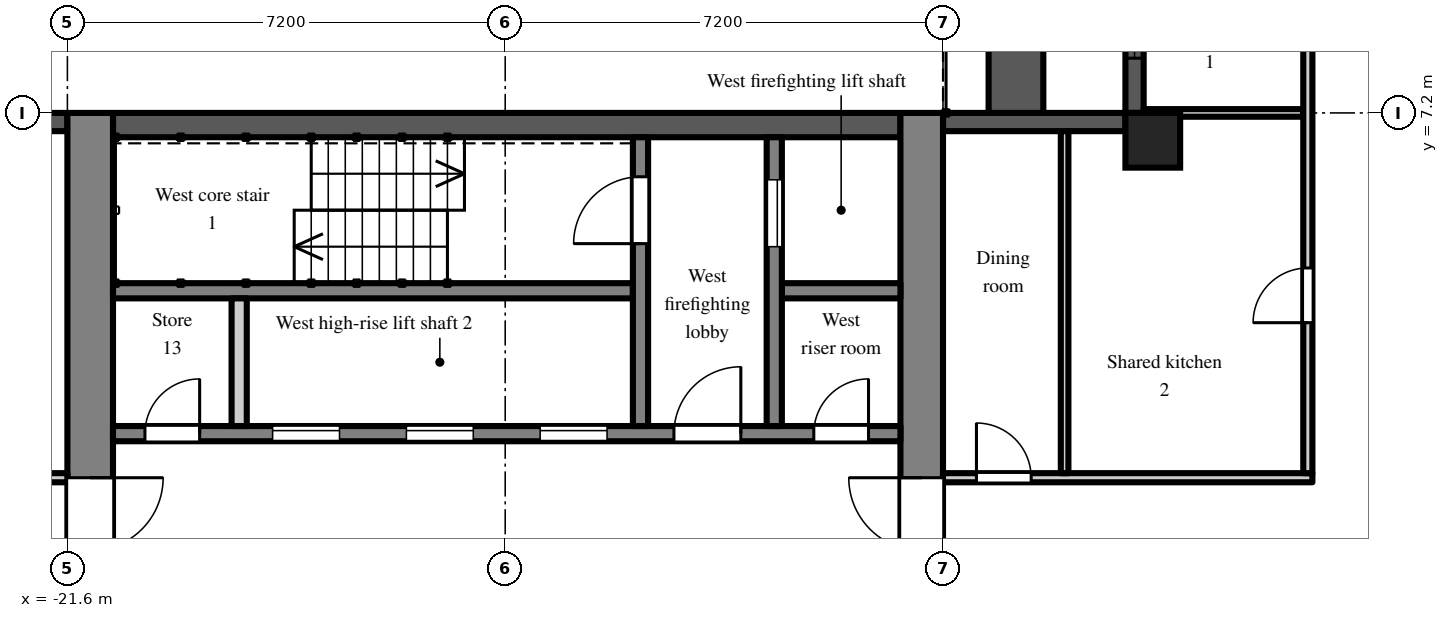
"""IFC4 building model, lengths in metres.
Left out: names, types, materials, properties, quantities, classifications, styles, units other than length and angle.
Written with IfcOpenShell. Run it as: python <this file> out.ifc"""

import sys

from ifc_helpers import new_model, si_unit, direction, frame, frame_2d, origin, origin_2d, place, context, subcontext, project, spatial, rectangle, extrude, element, fill, save


model = new_model("IFC4")
c1 = context("Model", 3, precision=1e-05, world=origin(), true_north=direction((0.0, 1.0)))
c2 = subcontext(c1, "Body", "Model", "MODEL_VIEW")
j1 = project(units=[si_unit("LENGTHUNIT", "METRE"), si_unit("PLANEANGLEUNIT", "RADIAN")], contexts=[c1])
p1 = place(None, origin())
s1 = spatial("IfcSite", under=j1, at=p1, CompositionType="ELEMENT")
p2 = place(p1, origin())
s2 = spatial("IfcBuilding", under=s1, at=p2, CompositionType="ELEMENT")
p3 = place(p2, frame((0.0, 0.0, 191.7)))
s3 = spatial("IfcBuildingStorey", under=s2, at=p3, CompositionType="ELEMENT", Elevation=191.7)
p4 = place(p3, frame((-3.75, 6.75, 0.0), z_axis=(0.0, 0.0, 1.0), x_axis=(1.0, 0.0, 0.0)))
e1 = element("IfcColumn", 1, at=p4, inside=s3, PredefinedType="COLUMN", context=c2, shape_type="SweptSolid", body=[
    extrude(rectangle(XDim=0.9, YDim=0.9, at=origin_2d()), origin(), (0.0, 0.0, 1.0), 3.0),
])
p5 = place(p3, frame((-4.05, 14.4, 0.0), z_axis=(0.0, 0.0, 1.0), x_axis=(0.0, -1.0, 0.0)))
e2 = element("IfcWall", 2, at=p5, inside=s3, PredefinedType="SOLIDWALL", context=c2, shape_type="SweptSolid", body=[
    extrude(rectangle(XDim=7.2, YDim=0.3, at=frame_2d((3.6, 0.0))), origin(), (0.0, 0.0, 1.0), 2.55),
])
p6 = place(p5, frame((3.0, 0.0, 0.0)))
e3 = element("IfcOpeningElement", 3, at=p6, cuts=e2, PredefinedType="OPENING", context=c2, shape_type="SweptSolid", body=[
    extrude(rectangle(XDim=1.2, YDim=2.05, at=frame_2d((0.6, 1.025))), frame((0.0, 0.16, 0.0), z_axis=(0.0, -1.0, 0.0), x_axis=(1.0, 0.0, 0.0)), (0.0, 0.0, 1.0), 0.32),
])
p7 = place(p5, frame((0.9, 0.0, 0.2)))
e4 = element("IfcOpeningElement", 4, at=p7, cuts=e2, PredefinedType="OPENING", context=c2, shape_type="SweptSolid", body=[
    extrude(rectangle(XDim=1.8, YDim=1.85, at=frame_2d((0.9, 0.925))), frame((0.0, 0.16, 0.0), z_axis=(0.0, -1.0, 0.0), x_axis=(1.0, 0.0, 0.0)), (0.0, 0.0, 1.0), 0.32),
])
p8 = place(p5, frame((4.5, 0.0, 0.2)))
e5 = element("IfcOpeningElement", 5, at=p8, cuts=e2, PredefinedType="OPENING", context=c2, shape_type="SweptSolid", body=[
    extrude(rectangle(XDim=1.8, YDim=1.85, at=frame_2d((0.9, 0.925))), frame((0.0, 0.16, 0.0), z_axis=(0.0, -1.0, 0.0), x_axis=(1.0, 0.0, 0.0)), (0.0, 0.0, 1.0), 0.32),
])
p9 = place(p3, frame((-4.2, 7.05, 0.0), z_axis=(0.0, 0.0, 1.0), x_axis=(-1.0, 0.0, 0.0)))
e6 = element("IfcWall", 6, at=p9, inside=s3, PredefinedType="SOLIDWALL", context=c2, shape_type="SweptSolid", body=[
    extrude(rectangle(XDim=3.0, YDim=0.3, at=frame_2d((1.5, 0.0))), origin(), (0.0, 0.0, 1.0), 2.55),
])
p10 = place(p3, frame((-21.6, 7.05, 0.0), z_axis=(0.0, 0.0, 1.0), x_axis=(-1.0, 0.0, 0.0)))
e7 = element("IfcWall", 7, at=p10, inside=s3, PredefinedType="SOLIDWALL", context=c2, shape_type="SweptSolid", body=[
    extrude(rectangle(XDim=2.7, YDim=0.3, at=frame_2d((1.35, 0.0))), origin(), (0.0, 0.0, 1.0), 2.3),
])
p11 = place(p10, frame((0.75, 0.0, 0.2)))
e8 = element("IfcOpeningElement", 8, at=p11, cuts=e7, PredefinedType="OPENING", context=c2, shape_type="SweptSolid", body=[
    extrude(rectangle(XDim=1.2, YDim=1.85, at=frame_2d((0.6, 0.925))), frame((0.0, 0.16, 0.0), z_axis=(0.0, -1.0, 0.0), x_axis=(1.0, 0.0, 0.0)), (0.0, 0.0, 1.0), 0.32),
])
p12 = place(p3, frame((-6.0, 7.2, 0.0), z_axis=(0.0, 0.0, 1.0), x_axis=(0.0, 1.0, 0.0)))
e9 = element("IfcWall", 9, at=p12, inside=s3, PredefinedType="PARAPET", context=c2, shape_type="SweptSolid", body=[
    extrude(rectangle(XDim=7.2, YDim=0.9, at=frame_2d((3.6, 0.0))), origin(), (0.0, 0.0, 1.0), 0.8),
])
p13 = place(p3, frame((-7.55, -7.2, 0.0), z_axis=(0.0, 0.0, 1.0), x_axis=(0.0, 1.0, 0.0)))
e10 = element("IfcWall", 10, at=p13, inside=s3, PredefinedType="SHEAR", context=c2, shape_type="SweptSolid", body=[
    extrude(rectangle(XDim=14.4, YDim=0.7, at=frame_2d((7.2, 0.0))), origin(), (0.0, 0.0, 1.0), 2.55),
])
p14 = place(p13, frame((6.0, 0.0, 0.0)))
e11 = element("IfcOpeningElement", 11, at=p14, cuts=e10, PredefinedType="OPENING", context=c2, shape_type="SweptSolid", body=[
    extrude(rectangle(XDim=2.4, YDim=2.2, at=frame_2d((1.2, 1.1))), frame((0.0, 0.36, 0.0), z_axis=(0.0, -1.0, 0.0), x_axis=(1.0, 0.0, 0.0)), (0.0, 0.0, 1.0), 0.72),
])
p15 = place(p3, frame((-21.225, -7.2, 0.0), z_axis=(0.0, 0.0, 1.0), x_axis=(0.0, 1.0, 0.0)))
e12 = element("IfcWall", 12, at=p15, inside=s3, PredefinedType="SHEAR", context=c2, shape_type="SweptSolid", body=[
    extrude(rectangle(XDim=14.4, YDim=0.75, at=frame_2d((7.2, 0.0))), origin(), (0.0, 0.0, 1.0), 2.55),
])
p16 = place(p15, frame((6.0, 0.0, 0.0)))
e13 = element("IfcOpeningElement", 13, at=p16, cuts=e12, PredefinedType="OPENING", context=c2, shape_type="SweptSolid", body=[
    extrude(rectangle(XDim=2.4, YDim=2.2, at=frame_2d((1.2, 1.1))), frame((0.0, 0.385, 0.0), z_axis=(0.0, -1.0, 0.0), x_axis=(1.0, 0.0, 0.0)), (0.0, 0.0, 1.0), 0.77),
])
p17 = place(p3, frame((-7.9, 7.0, 0.0), z_axis=(0.0, 0.0, 1.0), x_axis=(-1.0, 0.0, 0.0)))
e14 = element("IfcWall", 14, at=p17, inside=s3, PredefinedType="SHEAR", context=c2, shape_type="SweptSolid", body=[
    extrude(rectangle(XDim=12.95, YDim=0.4, at=frame_2d((6.475, 0.0))), origin(), (0.0, 0.0, 1.0), 2.55),
])
p18 = place(p3, frame((-7.9, 1.925, 0.0), z_axis=(0.0, 0.0, 1.0), x_axis=(-1.0, 0.0, 0.0)))
e15 = element("IfcWall", 15, at=p18, inside=s3, PredefinedType="SHEAR", context=c2, shape_type="SweptSolid", body=[
    extrude(rectangle(XDim=12.95, YDim=0.25, at=frame_2d((6.475, 0.0))), origin(), (0.0, 0.0, 1.0), 2.55),
])
p19 = place(p18, frame((4.825, 0.0, 0.0)))
e16 = element("IfcOpeningElement", 16, at=p19, cuts=e15, PredefinedType="OPENING", context=c2, shape_type="SweptSolid", body=[
    extrude(rectangle(XDim=1.1, YDim=2.1, at=frame_2d((0.55, 1.05))), frame((0.0, 0.135, 0.0), z_axis=(0.0, -1.0, 0.0), x_axis=(1.0, 0.0, 0.0)), (0.0, 0.0, 1.0), 0.27),
])
p20 = place(p18, frame((7.025, 0.0, 0.0)))
e17 = element("IfcOpeningElement", 17, at=p20, cuts=e15, PredefinedType="OPENING", context=c2, shape_type="SweptSolid", body=[
    extrude(rectangle(XDim=1.1, YDim=2.1, at=frame_2d((0.55, 1.05))), frame((0.0, 0.135, 0.0), z_axis=(0.0, -1.0, 0.0), x_axis=(1.0, 0.0, 0.0)), (0.0, 0.0, 1.0), 0.27),
])
p21 = place(p18, frame((9.225, 0.0, 0.0)))
e18 = element("IfcOpeningElement", 18, at=p21, cuts=e15, PredefinedType="OPENING", context=c2, shape_type="SweptSolid", body=[
    extrude(rectangle(XDim=1.1, YDim=2.1, at=frame_2d((0.55, 1.05))), frame((0.0, 0.135, 0.0), z_axis=(0.0, -1.0, 0.0), x_axis=(1.0, 0.0, 0.0)), (0.0, 0.0, 1.0), 0.27),
])
p22 = place(p18, frame((0.525, 0.0, 0.0)))
e19 = element("IfcOpeningElement", 19, at=p22, cuts=e15, PredefinedType="OPENING", context=c2, shape_type="SweptSolid", body=[
    extrude(rectangle(XDim=0.9, YDim=2.1, at=frame_2d((0.45, 1.05))), frame((0.0, 0.135, 0.0), z_axis=(0.0, -1.0, 0.0), x_axis=(1.0, 0.0, 0.0)), (0.0, 0.0, 1.0), 0.27),
])
p23 = place(p18, frame((2.625, 0.0, 0.0)))
e20 = element("IfcOpeningElement", 20, at=p23, cuts=e15, PredefinedType="OPENING", context=c2, shape_type="SweptSolid", body=[
    extrude(rectangle(XDim=1.1, YDim=2.1, at=frame_2d((0.55, 1.05))), frame((0.0, 0.135, 0.0), z_axis=(0.0, -1.0, 0.0), x_axis=(1.0, 0.0, 0.0)), (0.0, 0.0, 1.0), 0.27),
])
p24 = place(p18, frame((11.525, 0.0, 0.0)))
e21 = element("IfcOpeningElement", 21, at=p24, cuts=e15, PredefinedType="OPENING", context=c2, shape_type="SweptSolid", body=[
    extrude(rectangle(XDim=0.9, YDim=2.1, at=frame_2d((0.45, 1.05))), frame((0.0, 0.135, 0.0), z_axis=(0.0, -1.0, 0.0), x_axis=(1.0, 0.0, 0.0)), (0.0, 0.0, 1.0), 0.27),
])
p25 = place(p3, frame((-7.9, 4.275, 0.0), z_axis=(0.0, 0.0, 1.0), x_axis=(-1.0, 0.0, 0.0)))
e22 = element("IfcWall", 22, at=p25, inside=s3, PredefinedType="SHEAR", context=c2, shape_type="SweptSolid", body=[
    extrude(rectangle(XDim=1.95, YDim=0.25, at=frame_2d((0.975, 0.0))), origin(), (0.0, 0.0, 1.0), 2.55),
])
p26 = place(p3, frame((-12.3, 4.275, 0.0), z_axis=(0.0, 0.0, 1.0), x_axis=(-1.0, 0.0, 0.0)))
e23 = element("IfcWall", 23, at=p26, inside=s3, PredefinedType="SHEAR", context=c2, shape_type="SweptSolid", body=[
    extrude(rectangle(XDim=8.55, YDim=0.25, at=frame_2d((4.275, 0.0))), origin(), (0.0, 0.0, 1.0), 2.55),
])
p27 = place(p3, frame((-9.975, 2.05, 0.0), z_axis=(0.0, 0.0, 1.0), x_axis=(0.0, 1.0, 0.0)))
e24 = element("IfcWall", 24, at=p27, inside=s3, PredefinedType="SHEAR", context=c2, shape_type="SweptSolid", body=[
    extrude(rectangle(XDim=4.75, YDim=0.25, at=frame_2d((2.375, 0.0))), origin(), (0.0, 0.0, 1.0), 2.55),
])
p28 = place(p27, frame((2.95, 0.0, 0.0)))
e25 = element("IfcOpeningElement", 25, at=p28, cuts=e24, PredefinedType="OPENING", context=c2, shape_type="SweptSolid", body=[
    extrude(rectangle(XDim=1.1, YDim=2.1, at=frame_2d((0.55, 1.05))), frame((0.0, 0.135, 0.0), z_axis=(0.0, -1.0, 0.0), x_axis=(1.0, 0.0, 0.0)), (0.0, 0.0, 1.0), 0.27),
])
p29 = place(p3, frame((-12.175, 2.05, 0.0), z_axis=(0.0, 0.0, 1.0), x_axis=(0.0, 1.0, 0.0)))
e26 = element("IfcWall", 26, at=p29, inside=s3, PredefinedType="SHEAR", context=c2, shape_type="SweptSolid", body=[
    extrude(rectangle(XDim=4.75, YDim=0.25, at=frame_2d((2.375, 0.0))), origin(), (0.0, 0.0, 1.0), 2.55),
])
p30 = place(p29, frame((3.0, 0.0, 0.0)))
e27 = element("IfcOpeningElement", 27, at=p30, cuts=e26, PredefinedType="OPENING", context=c2, shape_type="SweptSolid", body=[
    extrude(rectangle(XDim=1.1, YDim=2.1, at=frame_2d((0.55, 1.05))), frame((0.0, 0.135, 0.0), z_axis=(0.0, -1.0, 0.0), x_axis=(1.0, 0.0, 0.0)), (0.0, 0.0, 1.0), 0.27),
])
p31 = place(p3, frame((-18.775, 2.05, 0.0), z_axis=(0.0, 0.0, 1.0), x_axis=(0.0, 1.0, 0.0)))
e28 = element("IfcWall", 28, at=p31, inside=s3, PredefinedType="PARTITIONING", context=c2, shape_type="SweptSolid", body=[
    extrude(rectangle(XDim=2.1, YDim=0.25, at=frame_2d((1.05, 0.0))), origin(), (0.0, 0.0, 1.0), 2.55),
])
p32 = place(p3, frame((-36.5, 1.2, 0.0), z_axis=(0.0, 0.0, 1.0), x_axis=(1.0, 0.0, 0.0)))
e29 = element("IfcWall", 29, at=p32, inside=s3, PredefinedType="PARTITIONING", context=c2, shape_type="SweptSolid", body=[
    extrude(rectangle(XDim=14.9, YDim=0.15, at=frame_2d((7.45, 0.0))), origin(), (0.0, 0.0, 1.0), 2.55),
])
p33 = place(p32, frame((10.1, 0.0, 0.0)))
e30 = element("IfcOpeningElement", 30, at=p33, cuts=e29, PredefinedType="OPENING", context=c2, shape_type="SweptSolid", body=[
    extrude(rectangle(XDim=1.0, YDim=2.1, at=frame_2d((0.5, 1.05))), frame((0.0, 0.085, 0.0), z_axis=(0.0, -1.0, 0.0), x_axis=(1.0, 0.0, 0.0)), (0.0, 0.0, 1.0), 0.17),
])
p34 = place(p32, frame((4.7, 0.0, 0.0)))
e31 = element("IfcOpeningElement", 31, at=p34, cuts=e29, PredefinedType="OPENING", context=c2, shape_type="SweptSolid", body=[
    extrude(rectangle(XDim=1.0, YDim=2.1, at=frame_2d((0.5, 1.05))), frame((0.0, 0.085, 0.0), z_axis=(0.0, -1.0, 0.0), x_axis=(1.0, 0.0, 0.0)), (0.0, 0.0, 1.0), 0.17),
])
p35 = place(p32, frame((1.15, 0.0, 0.0)))
e32 = element("IfcOpeningElement", 32, at=p35, cuts=e29, PredefinedType="OPENING", context=c2, shape_type="SweptSolid", body=[
    extrude(rectangle(XDim=1.8, YDim=2.1, at=frame_2d((0.9, 1.05))), frame((0.0, 0.085, 0.0), z_axis=(0.0, -1.0, 0.0), x_axis=(1.0, 0.0, 0.0)), (0.0, 0.0, 1.0), 0.17),
])
p36 = place(p3, frame((-7.2, 1.2, 0.0), z_axis=(0.0, 0.0, 1.0), x_axis=(1.0, 0.0, 0.0)))
e33 = element("IfcWall", 33, at=p36, inside=s3, PredefinedType="PARTITIONING", context=c2, shape_type="SweptSolid", body=[
    extrude(rectangle(XDim=6.075, YDim=0.15, at=frame_2d((3.038, 0.0))), origin(), (0.0, 0.0, 1.0), 2.55),
])
p37 = place(p36, frame((0.55, 0.0, 0.0)))
e34 = element("IfcOpeningElement", 34, at=p37, cuts=e33, PredefinedType="OPENING", context=c2, shape_type="SweptSolid", body=[
    extrude(rectangle(XDim=0.9, YDim=2.1, at=frame_2d((0.45, 1.05))), frame((0.0, 0.085, 0.0), z_axis=(0.0, -1.0, 0.0), x_axis=(1.0, 0.0, 0.0)), (0.0, 0.0, 1.0), 0.17),
])
p38 = place(p3, frame((-5.2, 1.275, 0.0), z_axis=(0.0, 0.0, 1.0), x_axis=(0.0, 1.0, 0.0)))
e35 = element("IfcWall", 35, at=p38, inside=s3, PredefinedType="PARTITIONING", context=c2, shape_type="SweptSolid", body=[
    extrude(rectangle(XDim=5.625, YDim=0.125, at=frame_2d((2.812, 0.0))), origin(), (0.0, 0.0, 1.0), 2.55),
])
p39 = place(p3, frame((-3.9, 7.2, 0.0), z_axis=(0.0, 0.0, 1.0), x_axis=(1.0, 0.0, 0.0)))
e36 = element("IfcWall", 36, at=p39, inside=s3, PredefinedType="PARTITIONING", context=c2, shape_type="SweptSolid", body=[
    extrude(rectangle(XDim=2.625, YDim=0.125, at=frame_2d((1.312, 0.0))), origin(), (0.0, 0.0, 1.0), 2.55),
])
p40 = place(p3, frame((-1.2, 1.275, 0.0), z_axis=(0.0, 0.0, 1.0), x_axis=(0.0, 1.0, 0.0)))
e37 = element("IfcWall", 37, at=p40, inside=s3, PredefinedType="PARTITIONING", context=c2, shape_type="SweptSolid", body=[
    extrude(rectangle(XDim=18.25, YDim=0.15, at=frame_2d((9.125, 0.0))), origin(), (0.0, 0.0, 1.0), 2.55),
])
p41 = place(p40, frame((2.475, 0.0, 0.0)))
e38 = element("IfcOpeningElement", 38, at=p41, cuts=e37, PredefinedType="OPENING", context=c2, shape_type="SweptSolid", body=[
    extrude(rectangle(XDim=0.9, YDim=2.1, at=frame_2d((0.45, 1.05))), frame((0.0, 0.085, 0.0), z_axis=(0.0, -1.0, 0.0), x_axis=(1.0, 0.0, 0.0)), (0.0, 0.0, 1.0), 0.17),
])
p42 = place(p40, frame((10.875, 0.0, 0.0)))
e39 = element("IfcOpeningElement", 39, at=p42, cuts=e37, PredefinedType="OPENING", context=c2, shape_type="SweptSolid", body=[
    extrude(rectangle(XDim=0.9, YDim=2.1, at=frame_2d((0.45, 1.05))), frame((0.0, 0.085, 0.0), z_axis=(0.0, -1.0, 0.0), x_axis=(1.0, 0.0, 0.0)), (0.0, 0.0, 1.0), 0.17),
])
p43 = place(p40, frame((13.575, 0.0, 0.0)))
e40 = element("IfcOpeningElement", 40, at=p43, cuts=e37, PredefinedType="OPENING", context=c2, shape_type="SweptSolid", body=[
    extrude(rectangle(XDim=0.9, YDim=2.1, at=frame_2d((0.45, 1.05))), frame((0.0, 0.085, 0.0), z_axis=(0.0, -1.0, 0.0), x_axis=(1.0, 0.0, 0.0)), (0.0, 0.0, 1.0), 0.17),
])
p44 = place(p40, frame((15.375, 0.0, 0.0)))
e41 = element("IfcOpeningElement", 41, at=p44, cuts=e37, PredefinedType="OPENING", context=c2, shape_type="SweptSolid", body=[
    extrude(rectangle(XDim=0.9, YDim=2.1, at=frame_2d((0.45, 1.05))), frame((0.0, 0.085, 0.0), z_axis=(0.0, -1.0, 0.0), x_axis=(1.0, 0.0, 0.0)), (0.0, 0.0, 1.0), 0.17),
])
p45 = place(p40, frame((17.075, 0.0, 0.0)))
e42 = element("IfcOpeningElement", 42, at=p45, cuts=e37, PredefinedType="OPENING", context=c2, shape_type="SweptSolid", body=[
    extrude(rectangle(XDim=0.9, YDim=2.1, at=frame_2d((0.45, 1.05))), frame((0.0, 0.085, 0.0), z_axis=(0.0, -1.0, 0.0), x_axis=(1.0, 0.0, 0.0)), (0.0, 0.0, 1.0), 0.17),
])
p46 = place(p8, origin())
e43 = element("IfcWindow", 43, at=p46, inside=s3, PartitioningType="SINGLE_PANEL", PredefinedType="WINDOW", context=c2, shape_type="SweptSolid", body=[
    extrude(rectangle(XDim=1.8, YDim=1.85, at=frame_2d((0.9, 0.925))), frame((0.0, 0.03, 0.0), z_axis=(0.0, -1.0, 0.0), x_axis=(1.0, 0.0, 0.0)), (0.0, 0.0, 1.0), 0.06),
])
fill(e5, e43)
p47 = place(p19, origin())
e44 = element("IfcDoor", 44, at=p47, inside=s3, OperationType="SLIDING_TO_LEFT", PredefinedType="DOOR", context=c2, shape_type="SweptSolid", body=[
    extrude(rectangle(XDim=1.1, YDim=2.1, at=frame_2d((0.55, 1.05))), frame((0.0, 0.025, 0.0), z_axis=(0.0, -1.0, 0.0), x_axis=(1.0, 0.0, 0.0)), (0.0, 0.0, 1.0), 0.05),
])
fill(e16, e44)
p48 = place(p20, origin())
e45 = element("IfcDoor", 45, at=p48, inside=s3, OperationType="SLIDING_TO_LEFT", PredefinedType="DOOR", context=c2, shape_type="SweptSolid", body=[
    extrude(rectangle(XDim=1.1, YDim=2.1, at=frame_2d((0.55, 1.05))), frame((0.0, 0.025, 0.0), z_axis=(0.0, -1.0, 0.0), x_axis=(1.0, 0.0, 0.0)), (0.0, 0.0, 1.0), 0.05),
])
fill(e17, e45)
p49 = place(p21, origin())
e46 = element("IfcDoor", 46, at=p49, inside=s3, OperationType="SLIDING_TO_LEFT", PredefinedType="DOOR", context=c2, shape_type="SweptSolid", body=[
    extrude(rectangle(XDim=1.1, YDim=2.1, at=frame_2d((0.55, 1.05))), frame((0.0, 0.025, 0.0), z_axis=(0.0, -1.0, 0.0), x_axis=(1.0, 0.0, 0.0)), (0.0, 0.0, 1.0), 0.05),
])
fill(e18, e46)
p50 = place(p28, origin())
e47 = element("IfcDoor", 47, at=p50, inside=s3, OperationType="SLIDING_TO_LEFT", PredefinedType="DOOR", context=c2, shape_type="SweptSolid", body=[
    extrude(rectangle(XDim=1.1, YDim=2.1, at=frame_2d((0.55, 1.05))), frame((0.0, 0.025, 0.0), z_axis=(0.0, -1.0, 0.0), x_axis=(1.0, 0.0, 0.0)), (0.0, 0.0, 1.0), 0.05),
])
fill(e25, e47)
p51 = place(p30, origin())
e48 = element("IfcDoor", 48, at=p51, inside=s3, OperationType="SINGLE_SWING_LEFT", PredefinedType="DOOR", context=c2, shape_type="SweptSolid", body=[
    extrude(rectangle(XDim=1.1, YDim=2.1, at=frame_2d((0.55, 1.05))), frame((0.0, 0.025, 0.0), z_axis=(0.0, -1.0, 0.0), x_axis=(1.0, 0.0, 0.0)), (0.0, 0.0, 1.0), 0.05),
])
fill(e27, e48)
p52 = place(p22, frame((0.9, 0.0, 0.0), z_axis=(0.0, 0.0, 1.0), x_axis=(-1.0, 0.0, 0.0)))
e49 = element("IfcDoor", 49, at=p52, inside=s3, OperationType="SINGLE_SWING_RIGHT", PredefinedType="DOOR", context=c2, shape_type="SweptSolid", body=[
    extrude(rectangle(XDim=0.9, YDim=2.1, at=frame_2d((0.45, 1.05))), frame((0.0, 0.025, 0.0), z_axis=(0.0, -1.0, 0.0), x_axis=(1.0, 0.0, 0.0)), (0.0, 0.0, 1.0), 0.05),
])
fill(e19, e49)
p53 = place(p23, frame((1.1, 0.0, 0.0), z_axis=(0.0, 0.0, 1.0), x_axis=(-1.0, 0.0, 0.0)))
e50 = element("IfcDoor", 50, at=p53, inside=s3, OperationType="SINGLE_SWING_RIGHT", PredefinedType="DOOR", context=c2, shape_type="SweptSolid", body=[
    extrude(rectangle(XDim=1.1, YDim=2.1, at=frame_2d((0.55, 1.05))), frame((0.0, 0.025, 0.0), z_axis=(0.0, -1.0, 0.0), x_axis=(1.0, 0.0, 0.0)), (0.0, 0.0, 1.0), 0.05),
])
fill(e20, e50)
p54 = place(p14, origin())
e51 = element("IfcDoor", 51, at=p54, inside=s3, OperationType="DOUBLE_DOOR_DOUBLE_SWING", PredefinedType="DOOR", context=c2, shape_type="SweptSolid", body=[
    extrude(rectangle(XDim=2.4, YDim=2.2, at=frame_2d((1.2, 1.1))), frame((0.0, 0.025, 0.0), z_axis=(0.0, -1.0, 0.0), x_axis=(1.0, 0.0, 0.0)), (0.0, 0.0, 1.0), 0.05),
])
fill(e11, e51)
p55 = place(p16, frame((2.4, 0.0, 0.0), z_axis=(0.0, 0.0, 1.0), x_axis=(-1.0, 0.0, 0.0)))
e52 = element("IfcDoor", 52, at=p55, inside=s3, OperationType="DOUBLE_DOOR_DOUBLE_SWING", PredefinedType="DOOR", context=c2, shape_type="SweptSolid", body=[
    extrude(rectangle(XDim=2.4, YDim=2.2, at=frame_2d((1.2, 1.1))), frame((0.0, 0.025, 0.0), z_axis=(0.0, -1.0, 0.0), x_axis=(1.0, 0.0, 0.0)), (0.0, 0.0, 1.0), 0.05),
])
fill(e13, e52)
p56 = place(p24, frame((0.9, 0.0, 0.0), z_axis=(0.0, 0.0, 1.0), x_axis=(-1.0, 0.0, 0.0)))
e53 = element("IfcDoor", 53, at=p56, inside=s3, OperationType="SINGLE_SWING_RIGHT", PredefinedType="DOOR", context=c2, shape_type="SweptSolid", body=[
    extrude(rectangle(XDim=0.9, YDim=2.1, at=frame_2d((0.45, 1.05))), frame((0.0, 0.025, 0.0), z_axis=(0.0, -1.0, 0.0), x_axis=(1.0, 0.0, 0.0)), (0.0, 0.0, 1.0), 0.05),
])
fill(e21, e53)
p57 = place(p41, origin())
e54 = element("IfcDoor", 54, at=p57, inside=s3, OperationType="SINGLE_SWING_LEFT", PredefinedType="DOOR", context=c2, shape_type="SweptSolid", body=[
    extrude(rectangle(XDim=0.9, YDim=2.1, at=frame_2d((0.45, 1.05))), frame((0.0, 0.025, 0.0), z_axis=(0.0, -1.0, 0.0), x_axis=(1.0, 0.0, 0.0)), (0.0, 0.0, 1.0), 0.05),
])
fill(e38, e54)
p58 = place(p37, origin())
e55 = element("IfcDoor", 55, at=p58, inside=s3, OperationType="SINGLE_SWING_LEFT", PredefinedType="DOOR", context=c2, shape_type="SweptSolid", body=[
    extrude(rectangle(XDim=0.9, YDim=2.1, at=frame_2d((0.45, 1.05))), frame((0.0, 0.025, 0.0), z_axis=(0.0, -1.0, 0.0), x_axis=(1.0, 0.0, 0.0)), (0.0, 0.0, 1.0), 0.05),
])
fill(e34, e55)
save(model, sys.argv[1])
